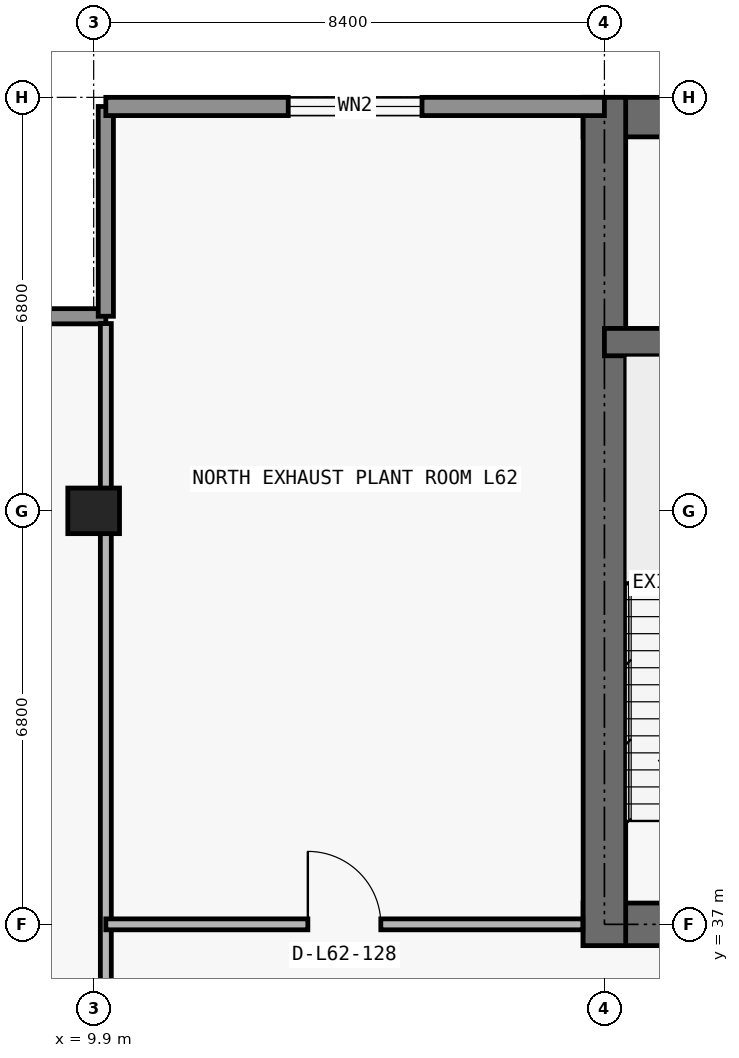
"""IFC4 building model, lengths in metres.
Left out: names, types, materials, properties, quantities, classifications, styles, units other than length and angle.
Written with IfcOpenShell. Run it as: python <this file> out.ifc"""

import sys

from ifc_helpers import new_model, si_unit, direction, frame, frame_2d, origin, origin_2d, place, context, subcontext, project, spatial, rectangle, extrude, element, fill, save


model = new_model("IFC4")
c1 = context("Model", 3, precision=1e-05, world=origin(), true_north=direction((0.0, 1.0)))
c2 = subcontext(c1, "Body", "Model", "MODEL_VIEW")
j1 = project(units=[si_unit("LENGTHUNIT", "METRE"), si_unit("PLANEANGLEUNIT", "RADIAN")], contexts=[c1])
p1 = place(None, origin())
s1 = spatial("IfcSite", under=j1, at=p1, CompositionType="ELEMENT")
p2 = place(p1, origin())
s2 = spatial("IfcBuilding", under=s1, at=p2, CompositionType="ELEMENT")
p3 = place(p2, frame((0.0, 0.0, 221.4)))
s3 = spatial("IfcBuildingStorey", under=s2, at=p3, CompositionType="ELEMENT", Elevation=221.4)
p4 = place(p3, frame((9.9, 43.8, 0.0), z_axis=(0.0, 0.0, 1.0), x_axis=(1.0, 0.0, 0.0)))
e1 = element("IfcColumn", 1, at=p4, inside=s3, PredefinedType="COLUMN", context=c2, shape_type="SweptSolid", body=[
    extrude(rectangle(XDim=0.85, YDim=0.75, at=origin_2d()), origin(), (0.0, 0.0, 1.0), 4.85),
])
p5 = place(p3, frame((17.95, 37.0, 0.0), z_axis=(0.0, 0.0, 1.0), x_axis=(1.0, 0.0, 0.0)))
e2 = element("IfcWall", 2, at=p5, inside=s3, PredefinedType="SHEAR", context=c2, shape_type="SweptSolid", body=[
    extrude(rectangle(XDim=41.9, YDim=0.7, at=frame_2d((20.95, 0.0))), origin(), (0.0, 0.0, 1.0), 4.85),
])
p6 = place(p5, frame((14.35, 0.0, 0.0)))
e3 = element("IfcOpeningElement", 3, at=p6, cuts=e2, PredefinedType="OPENING", context=c2, shape_type="SweptSolid", body=[
    extrude(rectangle(XDim=1.1, YDim=2.15, at=frame_2d((0.55, 1.075))), frame((0.0, 0.36, 0.0), z_axis=(0.0, -1.0, 0.0), x_axis=(1.0, 0.0, 0.0)), (0.0, 0.0, 1.0), 0.72),
])
p7 = place(p5, frame((6.2, 0.0, 0.0)))
e4 = element("IfcOpeningElement", 4, at=p7, cuts=e2, PredefinedType="OPENING", context=c2, shape_type="SweptSolid", body=[
    extrude(rectangle(XDim=1.05, YDim=2.15, at=frame_2d((0.525, 1.075))), frame((0.0, 0.36, 0.0), z_axis=(0.0, -1.0, 0.0), x_axis=(1.0, 0.0, 0.0)), (0.0, 0.0, 1.0), 0.72),
])
p8 = place(p5, frame((34.7, 0.0, 0.0)))
e5 = element("IfcOpeningElement", 5, at=p8, cuts=e2, PredefinedType="OPENING", context=c2, shape_type="SweptSolid", body=[
    extrude(rectangle(XDim=1.05, YDim=2.15, at=frame_2d((0.525, 1.075))), frame((0.0, 0.36, 0.0), z_axis=(0.0, -1.0, 0.0), x_axis=(1.0, 0.0, 0.0)), (0.0, 0.0, 1.0), 0.72),
])
p9 = place(p5, frame((10.812, 0.0, 0.0)))
e6 = element("IfcOpeningElement", 6, at=p9, cuts=e2, PredefinedType="OPENING", context=c2, shape_type="SweptSolid", body=[
    extrude(rectangle(XDim=1.05, YDim=2.15, at=frame_2d((0.525, 1.075))), frame((0.0, 0.36, 0.0), z_axis=(0.0, -1.0, 0.0), x_axis=(1.0, 0.0, 0.0)), (0.0, 0.0, 1.0), 0.72),
])
p10 = place(p5, frame((24.05, 0.0, 0.0)))
e7 = element("IfcOpeningElement", 7, at=p10, cuts=e2, PredefinedType="OPENING", context=c2, shape_type="SweptSolid", body=[
    extrude(rectangle(XDim=1.05, YDim=2.15, at=frame_2d((0.525, 1.075))), frame((0.0, 0.36, 0.0), z_axis=(0.0, -1.0, 0.0), x_axis=(1.0, 0.0, 0.0)), (0.0, 0.0, 1.0), 0.72),
])
p11 = place(p3, frame((17.95, 50.275, 0.0), z_axis=(0.0, 0.0, 1.0), x_axis=(1.0, 0.0, 0.0)))
e8 = element("IfcWall", 8, at=p11, inside=s3, PredefinedType="SHEAR", context=c2, shape_type="SweptSolid", body=[
    extrude(rectangle(XDim=41.9, YDim=0.65, at=frame_2d((20.95, 0.0))), origin(), (0.0, 0.0, 1.0), 4.85),
])
p12 = place(p3, frame((18.3, 36.65, 0.0), z_axis=(0.0, 0.0, 1.0), x_axis=(0.0, 1.0, 0.0)))
e9 = element("IfcWall", 9, at=p12, inside=s3, PredefinedType="SHEAR", context=c2, shape_type="SweptSolid", body=[
    extrude(rectangle(XDim=13.95, YDim=0.7, at=frame_2d((6.975, 0.0))), origin(), (0.0, 0.0, 1.0), 4.85),
])
p13 = place(p3, frame((18.3, 46.575, 0.0), z_axis=(0.0, 0.0, 1.0), x_axis=(1.0, 0.0, 0.0)))
e10 = element("IfcWall", 10, at=p13, inside=s3, PredefinedType="SHEAR", context=c2, shape_type="SweptSolid", body=[
    extrude(rectangle(XDim=41.2, YDim=0.45, at=frame_2d((20.6, 0.0))), origin(), (0.0, 0.0, 1.0), 4.85),
])
p14 = place(p13, frame((7.6, 0.0, 0.0)))
e11 = element("IfcOpeningElement", 11, at=p14, cuts=e10, PredefinedType="OPENING", context=c2, shape_type="SweptSolid", body=[
    extrude(rectangle(XDim=1.0, YDim=2.2, at=frame_2d((0.5, 1.1))), frame((0.0, 0.235, 0.0), z_axis=(0.0, -1.0, 0.0), x_axis=(1.0, 0.0, 0.0)), (0.0, 0.0, 1.0), 0.47),
])
p15 = place(p13, frame((32.625, 0.0, 0.0)))
e12 = element("IfcOpeningElement", 12, at=p15, cuts=e10, PredefinedType="OPENING", context=c2, shape_type="SweptSolid", body=[
    extrude(rectangle(XDim=1.05, YDim=2.15, at=frame_2d((0.525, 1.075))), frame((0.0, 0.235, 0.0), z_axis=(0.0, -1.0, 0.0), x_axis=(1.0, 0.0, 0.0)), (0.0, 0.0, 1.0), 0.47),
])
p16 = place(p3, frame((6.25, 47.0, 0.0), z_axis=(0.0, 0.0, 1.0), x_axis=(1.0, 0.0, 0.0)))
e13 = element("IfcWall", 13, at=p16, inside=s3, PredefinedType="ELEMENTEDWALL", context=c2, shape_type="SweptSolid", body=[
    extrude(rectangle(XDim=3.85, YDim=0.25, at=frame_2d((1.925, 0.0))), origin(), (0.0, 0.0, 1.0), 4.85),
])
p17 = place(p3, frame((10.1, 47.0, 0.0), z_axis=(0.0, 0.0, 1.0), x_axis=(0.0, 1.0, 0.0)))
e14 = element("IfcWall", 14, at=p17, inside=s3, PredefinedType="ELEMENTEDWALL", context=c2, shape_type="SweptSolid", body=[
    extrude(rectangle(XDim=3.45, YDim=0.25, at=frame_2d((1.725, 0.0))), origin(), (0.0, 0.0, 1.0), 4.85),
])
p18 = place(p3, frame((10.1, 50.45, 0.0), z_axis=(0.0, 0.0, 1.0), x_axis=(1.0, 0.0, 0.0)))
e15 = element("IfcWall", 15, at=p18, inside=s3, PredefinedType="STANDARD", context=c2, shape_type="SweptSolid", body=[
    extrude(rectangle(XDim=8.2, YDim=0.3, at=frame_2d((4.1, 0.0))), origin(), (0.0, 0.0, 1.0), 4.85),
])
p19 = place(p18, frame((3.0, 0.0, 0.85)))
e16 = element("IfcOpeningElement", 16, at=p19, cuts=e15, PredefinedType="OPENING", context=c2, shape_type="SweptSolid", body=[
    extrude(rectangle(XDim=2.2, YDim=1.55, at=frame_2d((1.1, 0.775))), frame((0.0, 0.16, 0.0), z_axis=(0.0, -1.0, 0.0), x_axis=(1.0, 0.0, 0.0)), (0.0, 0.0, 1.0), 0.32),
])
p20 = place(p3, frame((10.1, 12.9, 0.0), z_axis=(0.0, 0.0, 1.0), x_axis=(0.0, 1.0, 0.0)))
e17 = element("IfcWall", 17, at=p20, inside=s3, PredefinedType="PARTITIONING", context=c2, shape_type="SweptSolid", body=[
    extrude(rectangle(XDim=33.98, YDim=0.18, at=frame_2d((16.99, 0.0))), origin(), (0.0, 0.0, 1.0), 3.814),
])
p21 = place(p3, frame((10.1, 37.0, 0.0), z_axis=(0.0, 0.0, 1.0), x_axis=(1.0, 0.0, 0.0)))
e18 = element("IfcWall", 18, at=p21, inside=s3, PredefinedType="PARTITIONING", context=c2, shape_type="SweptSolid", body=[
    extrude(rectangle(XDim=7.845, YDim=0.18, at=frame_2d((3.922, 0.0))), origin(), (0.0, 0.0, 1.0), 4.85),
])
p22 = place(p21, frame((3.323, 0.0, 0.0)))
e19 = element("IfcOpeningElement", 19, at=p22, cuts=e18, PredefinedType="OPENING", context=c2, shape_type="SweptSolid", body=[
    extrude(rectangle(XDim=1.2, YDim=2.2, at=frame_2d((0.6, 1.1))), frame((0.0, 0.1, 0.0), z_axis=(0.0, -1.0, 0.0), x_axis=(1.0, 0.0, 0.0)), (0.0, 0.0, 1.0), 0.2),
])
p23 = place(p19, origin())
e20 = element("IfcWindow", 20, at=p23, inside=s3, PartitioningType="SINGLE_PANEL", PredefinedType="WINDOW", context=c2, shape_type="SweptSolid", body=[
    extrude(rectangle(XDim=2.2, YDim=1.55, at=frame_2d((1.1, 0.775))), frame((0.0, 0.03, 0.0), z_axis=(0.0, -1.0, 0.0), x_axis=(1.0, 0.0, 0.0)), (0.0, 0.0, 1.0), 0.06),
])
fill(e16, e20)
p24 = place(p22, origin())
e21 = element("IfcDoor", 21, at=p24, inside=s3, OperationType="SINGLE_SWING_LEFT", PredefinedType="DOOR", context=c2, shape_type="SweptSolid", body=[
    extrude(rectangle(XDim=1.2, YDim=2.2, at=frame_2d((0.6, 1.1))), frame((0.0, 0.025, 0.0), z_axis=(0.0, -1.0, 0.0), x_axis=(1.0, 0.0, 0.0)), (0.0, 0.0, 1.0), 0.05),
])
fill(e19, e21)
save(model, sys.argv[1])
